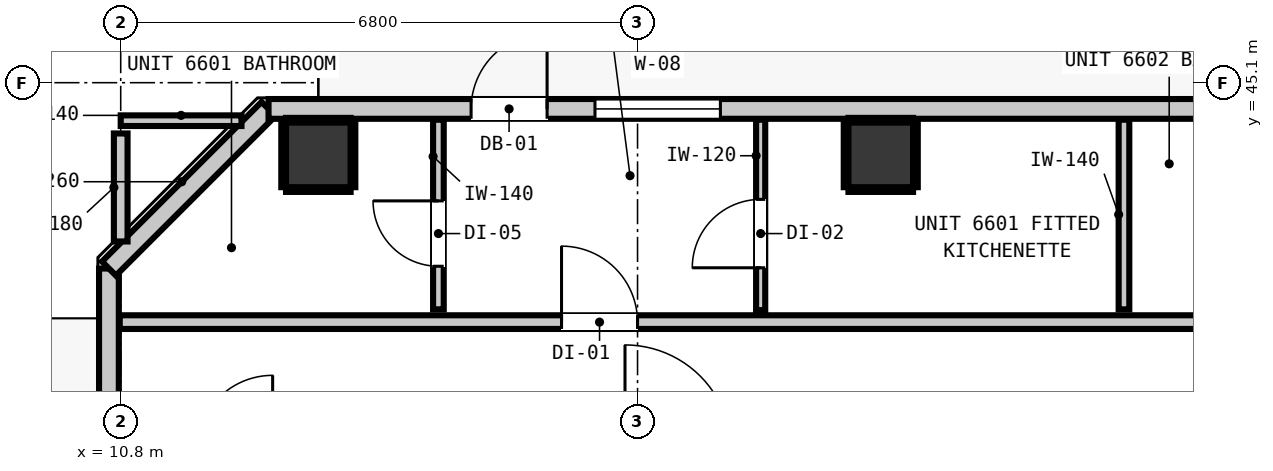
"""IFC4 building model, lengths in metres.
Left out: names, types, materials, properties, quantities, classifications, styles, units other than length and angle.
Written with IfcOpenShell. Run it as: python <this file> out.ifc"""

import sys

from ifc_helpers import new_model, si_unit, direction, frame, frame_2d, origin, origin_2d, place, context, subcontext, project, spatial, rectangle, extrude, element, fill, save


model = new_model("IFC4")
c1 = context("Model", 3, precision=1e-05, world=origin(), true_north=direction((0.0, 1.0)))
c2 = subcontext(c1, "Body", "Model", "MODEL_VIEW")
j1 = project(units=[si_unit("LENGTHUNIT", "METRE"), si_unit("PLANEANGLEUNIT", "RADIAN")], contexts=[c1])
p1 = place(None, origin())
s1 = spatial("IfcSite", under=j1, at=p1, CompositionType="ELEMENT")
p2 = place(p1, origin())
s2 = spatial("IfcBuilding", under=s1, at=p2, CompositionType="ELEMENT")
p3 = place(p2, frame((0.0, 0.0, 226.68)))
s3 = spatial("IfcBuildingStorey", under=s2, at=p3, CompositionType="ELEMENT", Elevation=226.68)
for number, where, z_axis, x_axis in (
    (1, (13.4, 44.15, 0.0), (0.0, 0.0, 1.0), (1.0, 0.0, 0.0)),
    (2, (20.8, 44.15, 0.0), (0.0, 0.0, 1.0), (1.0, 0.0, 0.0)),
):
    element("IfcColumn", number, at=place(p3, frame(where, z_axis=z_axis, x_axis=x_axis)), inside=s3, PredefinedType="COLUMN", context=c2, shape_type="SweptSolid", body=[
        extrude(rectangle(XDim=0.85, YDim=0.85, at=origin_2d()), origin(), (0.0, 0.0, 1.0), 4.18),
    ])
p4 = place(p3, frame((10.645, 12.345, 0.0), z_axis=(0.0, 0.0, 1.0), x_axis=(0.0, 1.0, 0.0)))
e3 = element("IfcWall", 3, at=p4, inside=s3, PredefinedType="STANDARD", context=c2, shape_type="SweptSolid", body=[
    extrude(rectangle(XDim=30.31, YDim=0.26, at=frame_2d((15.155, 0.0))), origin(), (0.0, 0.0, 1.0), 4.18),
])
p5 = place(p4, frame((0.91, 0.0, 0.0)))
e4 = element("IfcOpeningElement", 4, at=p5, cuts=e3, PredefinedType="OPENING", context=c2, shape_type="SweptSolid", body=[
    extrude(rectangle(XDim=1.0, YDim=2.15, at=frame_2d((0.5, 1.075))), frame((0.0, 0.14, 0.0), z_axis=(0.0, -1.0, 0.0), x_axis=(1.0, 0.0, 0.0)), (0.0, 0.0, 1.0), 0.28),
])
p6 = place(p4, frame((3.732, 0.0, 0.85)))
e5 = element("IfcOpeningElement", 5, at=p6, cuts=e3, PredefinedType="OPENING", context=c2, shape_type="SweptSolid", body=[
    extrude(rectangle(XDim=1.65, YDim=1.75, at=frame_2d((0.825, 0.875))), frame((0.0, 0.14, 0.0), z_axis=(0.0, -1.0, 0.0), x_axis=(1.0, 0.0, 0.0)), (0.0, 0.0, 1.0), 0.28),
])
p7 = place(p3, frame((10.645, 42.655, 0.0), z_axis=(0.0, 0.0, 1.0), x_axis=(0.707147883682, 0.707065676302, 0.0)))
e6 = element("IfcWall", 6, at=p7, inside=s3, PredefinedType="STANDARD", context=c2, shape_type="SweptSolid", body=[
    extrude(rectangle(XDim=2.97, YDim=0.26, at=frame_2d((1.485, 0.0))), origin(), (0.0, 0.0, 1.0), 4.18),
])
p8 = place(p3, frame((12.745, 44.755, 0.0), z_axis=(0.0, 0.0, 1.0), x_axis=(1.0, 0.0, 0.0)))
e7 = element("IfcWall", 7, at=p8, inside=s3, PredefinedType="STANDARD", context=c2, shape_type="SweptSolid", body=[
    extrude(rectangle(XDim=32.71, YDim=0.26, at=frame_2d((16.355, 0.0))), origin(), (0.0, 0.0, 1.0), 4.18),
])
p9 = place(p8, frame((2.665, 0.0, 0.0)))
e8 = element("IfcOpeningElement", 8, at=p9, cuts=e7, PredefinedType="OPENING", context=c2, shape_type="SweptSolid", body=[
    extrude(rectangle(XDim=1.0, YDim=2.15, at=frame_2d((0.5, 1.075))), frame((0.0, 0.14, 0.0), z_axis=(0.0, -1.0, 0.0), x_axis=(1.0, 0.0, 0.0)), (0.0, 0.0, 1.0), 0.28),
])
p10 = place(p8, frame((4.295, 0.0, 0.85)))
e9 = element("IfcOpeningElement", 9, at=p10, cuts=e7, PredefinedType="OPENING", context=c2, shape_type="SweptSolid", body=[
    extrude(rectangle(XDim=1.65, YDim=1.75, at=frame_2d((0.825, 0.875))), frame((0.0, 0.14, 0.0), z_axis=(0.0, -1.0, 0.0), x_axis=(1.0, 0.0, 0.0)), (0.0, 0.0, 1.0), 0.28),
])
p11 = place(p8, frame((27.6, 0.0, 0.85)))
e10 = element("IfcOpeningElement", 10, at=p11, cuts=e7, PredefinedType="OPENING", context=c2, shape_type="SweptSolid", body=[
    extrude(rectangle(XDim=1.65, YDim=1.75, at=frame_2d((0.825, 0.875))), frame((0.0, 0.14, 0.0), z_axis=(0.0, -1.0, 0.0), x_axis=(1.0, 0.0, 0.0)), (0.0, 0.0, 1.0), 0.28),
])
p12 = place(p3, frame((10.787, 41.95, 0.0), z_axis=(0.0, 0.0, 1.0), x_axis=(1.0, 0.0, 0.0)))
e11 = element("IfcWall", 11, at=p12, inside=s3, PredefinedType="PARTITIONING", context=c2, shape_type="SweptSolid", body=[
    extrude(rectangle(XDim=36.626, YDim=0.18, at=frame_2d((18.313, 0.0))), origin(), (0.0, 0.0, 1.0), 4.18),
])
p13 = place(p12, frame((5.813, 0.0, 0.0)))
e12 = element("IfcOpeningElement", 12, at=p13, cuts=e11, PredefinedType="OPENING", context=c2, shape_type="SweptSolid", body=[
    extrude(rectangle(XDim=1.0, YDim=2.15, at=frame_2d((0.5, 1.075))), frame((0.0, 0.1, 0.0), z_axis=(0.0, -1.0, 0.0), x_axis=(1.0, 0.0, 0.0)), (0.0, 0.0, 1.0), 0.2),
])
p14 = place(p12, frame((24.363, 0.0, 0.0)))
e13 = element("IfcOpeningElement", 13, at=p14, cuts=e11, PredefinedType="OPENING", context=c2, shape_type="SweptSolid", body=[
    extrude(rectangle(XDim=1.0, YDim=2.15, at=frame_2d((0.5, 1.075))), frame((0.0, 0.1, 0.0), z_axis=(0.0, -1.0, 0.0), x_axis=(1.0, 0.0, 0.0)), (0.0, 0.0, 1.0), 0.2),
])
p15 = place(p3, frame((10.8, 44.6, 0.0), z_axis=(0.0, 0.0, 1.0), x_axis=(1.0, 0.0, 0.0)))
e14 = element("IfcWall", 14, at=p15, inside=s3, PredefinedType="PARTITIONING", context=c2, shape_type="SweptSolid", body=[
    extrude(rectangle(XDim=1.589, YDim=0.14, at=frame_2d((0.794, 0.0))), origin(), (0.0, 0.0, 1.0), 4.18),
])
p16 = place(p3, frame((10.8, 43.011, 0.0), z_axis=(0.0, 0.0, 1.0), x_axis=(0.0, 1.0, 0.0)))
e15 = element("IfcWall", 15, at=p16, inside=s3, PredefinedType="PARTITIONING", context=c2, shape_type="SweptSolid", body=[
    extrude(rectangle(XDim=1.421, YDim=0.18, at=frame_2d((0.71, 0.0))), origin(), (0.0, 0.0, 1.0), 4.18),
])
p17 = place(p3, frame((14.98, 42.118, 0.0), z_axis=(0.0, 0.0, 1.0), x_axis=(0.0, 1.0, 0.0)))
e16 = element("IfcWall", 16, at=p17, inside=s3, PredefinedType="PARTITIONING", context=c2, shape_type="SweptSolid", body=[
    extrude(rectangle(XDim=2.495, YDim=0.14, at=frame_2d((1.248, 0.0))), origin(), (0.0, 0.0, 1.0), 4.18),
])
p18 = place(p17, frame((0.567, 0.0, 0.0)))
e17 = element("IfcOpeningElement", 17, at=p18, cuts=e16, PredefinedType="OPENING", context=c2, shape_type="SweptSolid", body=[
    extrude(rectangle(XDim=0.86, YDim=2.02, at=frame_2d((0.43, 1.01))), frame((0.0, 0.08, 0.0), z_axis=(0.0, -1.0, 0.0), x_axis=(1.0, 0.0, 0.0)), (0.0, 0.0, 1.0), 0.16),
])
p19 = place(p3, frame((24.0, 42.118, 0.0), z_axis=(0.0, 0.0, 1.0), x_axis=(0.0, 1.0, 0.0)))
e18 = element("IfcWall", 18, at=p19, inside=s3, PredefinedType="PARTITIONING", context=c2, shape_type="SweptSolid", body=[
    extrude(rectangle(XDim=2.495, YDim=0.14, at=frame_2d((1.248, 0.0))), origin(), (0.0, 0.0, 1.0), 4.18),
])
p20 = place(p3, frame((19.22, 42.108, 0.0), z_axis=(0.0, 0.0, 1.0), x_axis=(0.0, 1.0, 0.0)))
e19 = element("IfcWall", 19, at=p20, inside=s3, PredefinedType="PARTITIONING", context=c2, shape_type="SweptSolid", body=[
    extrude(rectangle(XDim=2.505, YDim=0.12, at=frame_2d((1.252, 0.0))), origin(), (0.0, 0.0, 1.0), 4.18),
])
p21 = place(p20, frame((0.557, 0.0, 0.0)))
e20 = element("IfcOpeningElement", 20, at=p21, cuts=e19, PredefinedType="OPENING", context=c2, shape_type="SweptSolid", body=[
    extrude(rectangle(XDim=0.9, YDim=2.1, at=frame_2d((0.45, 1.05))), frame((0.0, 0.07, 0.0), z_axis=(0.0, -1.0, 0.0), x_axis=(1.0, 0.0, 0.0)), (0.0, 0.0, 1.0), 0.14),
])
for number, where, z_axis, x_axis in (
    (21, (12.975, 43.693, 0.0), (0.0, 0.0, 1.0), (1.0, 0.0, 0.0)),
    (22, (12.975, 44.607, 0.0), (0.0, 0.0, 1.0), (1.0, 0.0, 0.0)),
    (23, (12.943, 43.725, 0.0), (0.0, 0.0, 1.0), (0.0, 1.0, 0.0)),
    (24, (13.857, 43.725, 0.0), (0.0, 0.0, 1.0), (0.0, 1.0, 0.0)),
):
    element("IfcWall", number, at=place(p3, frame(where, z_axis=z_axis, x_axis=x_axis)), inside=s3, PredefinedType="PARTITIONING", context=c2, shape_type="SweptSolid", body=[
        extrude(rectangle(XDim=0.85, YDim=0.06, at=frame_2d((0.425, 0.0))), origin(), (0.0, 0.0, 1.0), 1.45),
    ])
for number, where, z_axis, x_axis in (
    (25, (20.375, 43.693, 0.0), (0.0, 0.0, 1.0), (1.0, 0.0, 0.0)),
    (26, (20.375, 44.607, 0.0), (0.0, 0.0, 1.0), (1.0, 0.0, 0.0)),
):
    element("IfcWall", number, at=place(p3, frame(where, z_axis=z_axis, x_axis=x_axis)), inside=s3, PredefinedType="PARTITIONING", context=c2, shape_type="SweptSolid", body=[
        extrude(rectangle(XDim=0.85, YDim=0.06, at=frame_2d((0.425, 0.0))), origin(), (0.0, 0.0, 1.0), 1.45),
    ])
for number, where, z_axis, x_axis in (
    (27, (20.343, 43.725, 0.0), (0.0, 0.0, 1.0), (0.0, 1.0, 0.0)),
    (28, (21.257, 43.725, 0.0), (0.0, 0.0, 1.0), (0.0, 1.0, 0.0)),
):
    element("IfcWall", number, at=place(p3, frame(where, z_axis=z_axis, x_axis=x_axis)), inside=s3, PredefinedType="PARTITIONING", context=c2, shape_type="SweptSolid", body=[
        extrude(rectangle(XDim=0.85, YDim=0.06, at=frame_2d((0.425, 0.0))), origin(), (0.0, 0.0, 1.0), 1.45),
    ])
p22 = place(p9, origin())
e29 = element("IfcDoor", 29, at=p22, inside=s3, OperationType="SINGLE_SWING_RIGHT", PredefinedType="DOOR", context=c2, shape_type="SweptSolid", body=[
    extrude(rectangle(XDim=1.0, YDim=2.15, at=frame_2d((0.5, 1.075))), frame((0.0, 0.025, 0.0), z_axis=(0.0, -1.0, 0.0), x_axis=(1.0, 0.0, 0.0)), (0.0, 0.0, 1.0), 0.05),
])
fill(e8, e29)
p23 = place(p10, origin())
e30 = element("IfcWindow", 30, at=p23, inside=s3, PartitioningType="SINGLE_PANEL", PredefinedType="WINDOW", context=c2, shape_type="SweptSolid", body=[
    extrude(rectangle(XDim=1.65, YDim=1.75, at=frame_2d((0.825, 0.875))), frame((0.0, 0.03, 0.0), z_axis=(0.0, -1.0, 0.0), x_axis=(1.0, 0.0, 0.0)), (0.0, 0.0, 1.0), 0.06),
])
fill(e9, e30)
p24 = place(p13, origin())
e31 = element("IfcDoor", 31, at=p24, inside=s3, OperationType="SINGLE_SWING_LEFT", PredefinedType="DOOR", context=c2, shape_type="SweptSolid", body=[
    extrude(rectangle(XDim=1.0, YDim=2.15, at=frame_2d((0.5, 1.075))), frame((0.0, 0.025, 0.0), z_axis=(0.0, -1.0, 0.0), x_axis=(1.0, 0.0, 0.0)), (0.0, 0.0, 1.0), 0.05),
])
fill(e12, e31)
p25 = place(p18, origin())
e32 = element("IfcDoor", 32, at=p25, inside=s3, OperationType="SINGLE_SWING_RIGHT", PredefinedType="DOOR", context=c2, shape_type="SweptSolid", body=[
    extrude(rectangle(XDim=0.86, YDim=2.02, at=frame_2d((0.43, 1.01))), frame((0.0, 0.025, 0.0), z_axis=(0.0, -1.0, 0.0), x_axis=(1.0, 0.0, 0.0)), (0.0, 0.0, 1.0), 0.05),
])
fill(e17, e32)
p26 = place(p21, origin())
e33 = element("IfcDoor", 33, at=p26, inside=s3, OperationType="SINGLE_SWING_LEFT", PredefinedType="DOOR", context=c2, shape_type="SweptSolid", body=[
    extrude(rectangle(XDim=0.9, YDim=2.1, at=frame_2d((0.45, 1.05))), frame((0.0, 0.025, 0.0), z_axis=(0.0, -1.0, 0.0), x_axis=(1.0, 0.0, 0.0)), (0.0, 0.0, 1.0), 0.05),
])
fill(e20, e33)
save(model, sys.argv[1])
